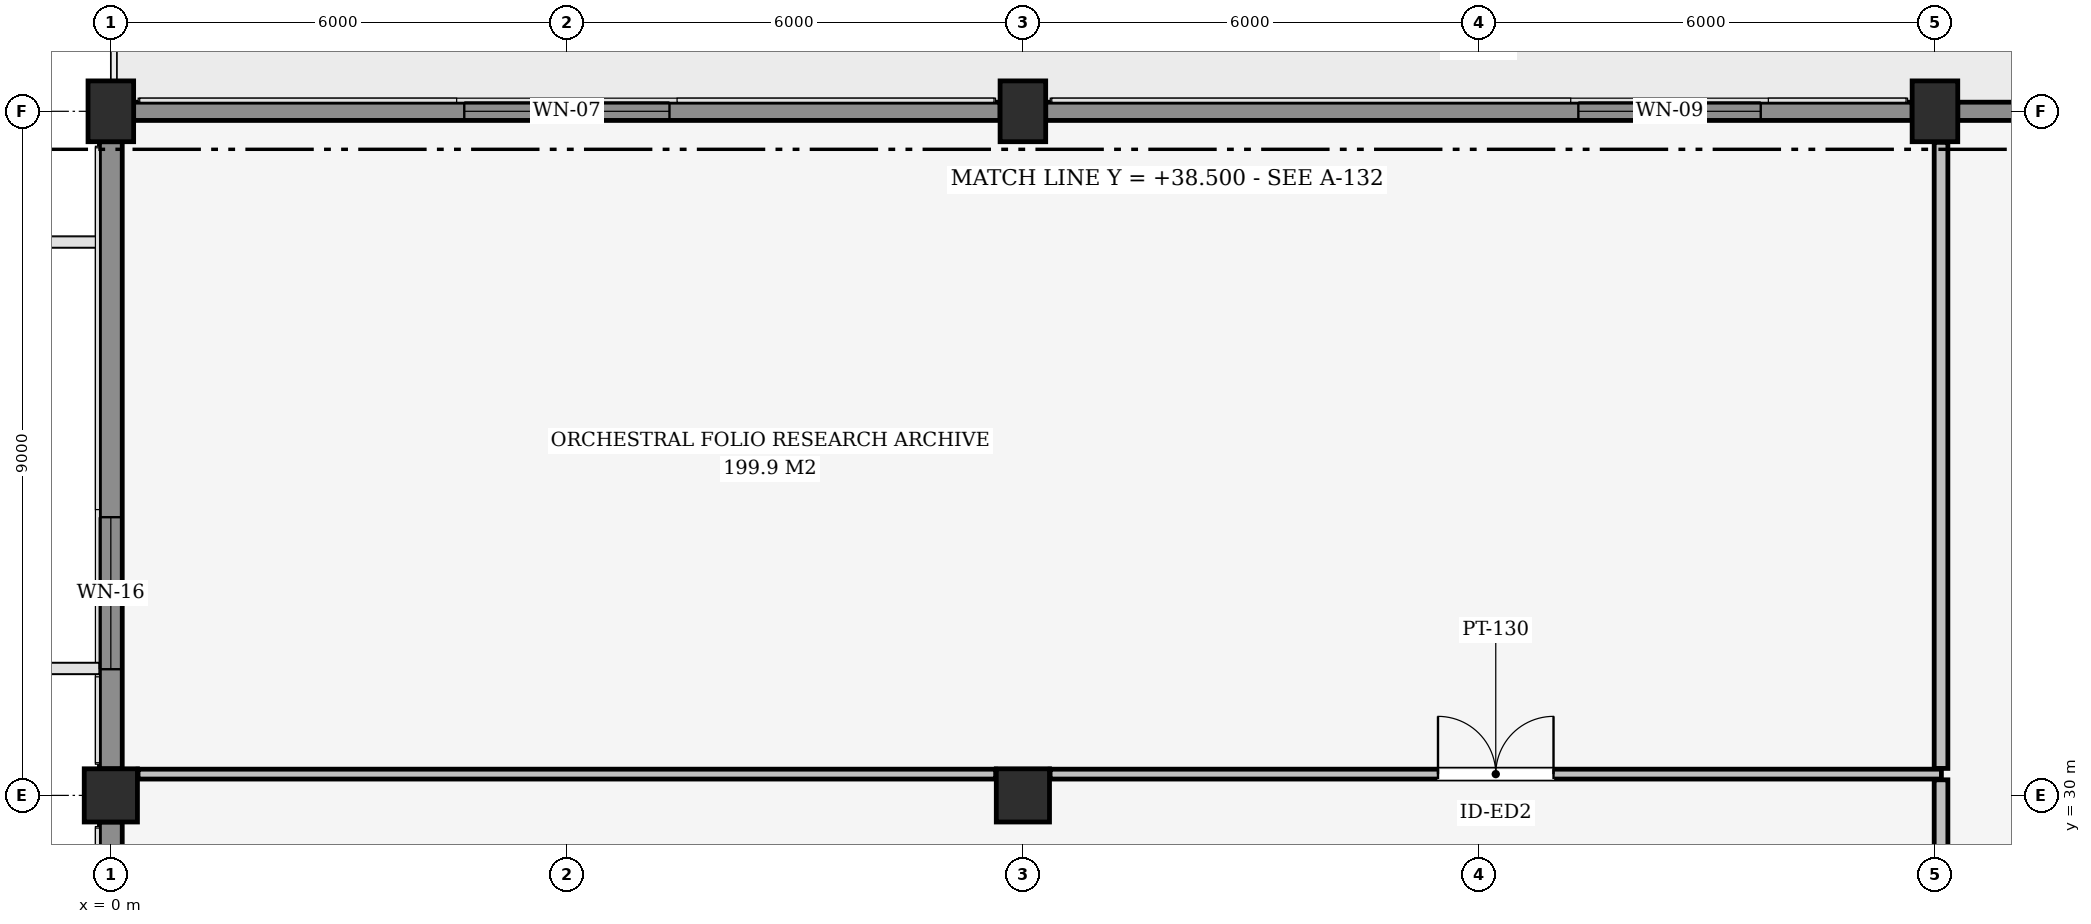
"""IFC4 building model, lengths in metres.
Left out: names, types, materials, properties, quantities, classifications, styles, units other than length and angle.
Written with IfcOpenShell. Run it as: python <this file> out.ifc"""

import sys

from ifc_helpers import new_model, si_unit, direction, frame, frame_2d, origin, origin_2d, place, context, subcontext, project, spatial, rectangle, extrude, element, fill, save


model = new_model("IFC4")
c1 = context("Model", 3, precision=1e-05, world=origin(), true_north=direction((0.0, 1.0)))
c2 = subcontext(c1, "Body", "Model", "MODEL_VIEW")
j1 = project(units=[si_unit("LENGTHUNIT", "METRE"), si_unit("PLANEANGLEUNIT", "RADIAN")], contexts=[c1])
p1 = place(None, origin())
s1 = spatial("IfcSite", under=j1, at=p1, CompositionType="ELEMENT")
p2 = place(p1, origin())
s2 = spatial("IfcBuilding", under=s1, at=p2, CompositionType="ELEMENT")
p3 = place(p2, frame((0.0, 0.0, 9.3)))
s3 = spatial("IfcBuildingStorey", under=s2, at=p3, CompositionType="ELEMENT", Elevation=9.3)
for number, where, z_axis, x_axis in (
    (1, (0.0, 39.0, 0.0), (0.0, 0.0, 1.0), (1.0, 0.0, 0.0)),
    (2, (12.0, 39.0, 0.0), (0.0, 0.0, 1.0), (1.0, 0.0, 0.0)),
    (3, (24.0, 39.0, 0.0), (0.0, 0.0, 1.0), (1.0, 0.0, 0.0)),
):
    element("IfcColumn", number, at=place(p3, frame(where, z_axis=z_axis, x_axis=x_axis)), inside=s3, PredefinedType="COLUMN", context=c2, shape_type="SweptSolid", body=[
        extrude(rectangle(XDim=0.6, YDim=0.8, at=origin_2d()), origin(), (0.0, 0.0, 1.0), 4.5),
    ])
for number, where, z_axis, x_axis in (
    (4, (0.0, 30.0, 0.0), (0.0, 0.0, 1.0), (1.0, 0.0, 0.0)),
    (5, (12.0, 30.0, 0.0), (0.0, 0.0, 1.0), (1.0, 0.0, 0.0)),
):
    element("IfcColumn", number, at=place(p3, frame(where, z_axis=z_axis, x_axis=x_axis)), inside=s3, PredefinedType="COLUMN", context=c2, shape_type="SweptSolid", body=[
        extrude(rectangle(XDim=0.7, YDim=0.7, at=origin_2d()), origin(), (0.0, 0.0, 1.0), 4.5),
    ])
p4 = place(p3, frame((0.3, 39.0, 0.0), z_axis=(0.0, 0.0, 1.0), x_axis=(1.0, 0.0, 0.0)))
e6 = element("IfcWall", 6, at=p4, inside=s3, PredefinedType="SOLIDWALL", context=c2, shape_type="SweptSolid", body=[
    extrude(rectangle(XDim=11.4, YDim=0.24, at=frame_2d((5.7, 0.0))), origin(), (0.0, 0.0, 1.0), 3.873),
])
p5 = place(p4, frame((4.35, 0.0, 0.85)))
e7 = element("IfcOpeningElement", 7, at=p5, cuts=e6, PredefinedType="OPENING", context=c2, shape_type="SweptSolid", body=[
    extrude(rectangle(XDim=2.7, YDim=1.95, at=frame_2d((1.35, 0.975))), frame((0.0, 0.13, 0.0), z_axis=(0.0, -1.0, 0.0), x_axis=(1.0, 0.0, 0.0)), (0.0, 0.0, 1.0), 0.26),
])
p6 = place(p3, frame((12.3, 39.0, 0.0), z_axis=(0.0, 0.0, 1.0), x_axis=(1.0, 0.0, 0.0)))
e8 = element("IfcWall", 8, at=p6, inside=s3, PredefinedType="SOLIDWALL", context=c2, shape_type="SweptSolid", body=[
    extrude(rectangle(XDim=11.4, YDim=0.24, at=frame_2d((5.7, 0.0))), origin(), (0.0, 0.0, 1.0), 3.873),
])
p7 = place(p6, frame((7.008, 0.0, 0.85)))
e9 = element("IfcOpeningElement", 9, at=p7, cuts=e8, PredefinedType="OPENING", context=c2, shape_type="SweptSolid", body=[
    extrude(rectangle(XDim=2.4, YDim=0.95, at=frame_2d((1.2, 0.475))), frame((0.0, 0.13, 0.0), z_axis=(0.0, -1.0, 0.0), x_axis=(1.0, 0.0, 0.0)), (0.0, 0.0, 1.0), 0.26),
])
p8 = place(p3, frame((24.3, 39.0, 0.0), z_axis=(0.0, 0.0, 1.0), x_axis=(1.0, 0.0, 0.0)))
e10 = element("IfcWall", 10, at=p8, inside=s3, PredefinedType="SOLIDWALL", context=c2, shape_type="SweptSolid", body=[
    extrude(rectangle(XDim=11.4, YDim=0.24, at=frame_2d((5.7, 0.0))), origin(), (0.0, 0.0, 1.0), 3.873),
])
p9 = place(p8, frame((4.9, 0.0, 0.0)))
e11 = element("IfcOpeningElement", 11, at=p9, cuts=e10, PredefinedType="OPENING", context=c2, shape_type="SweptSolid", body=[
    extrude(rectangle(XDim=1.6, YDim=2.3, at=frame_2d((0.8, 1.15))), frame((0.0, 0.13, 0.0), z_axis=(0.0, -1.0, 0.0), x_axis=(1.0, 0.0, 0.0)), (0.0, 0.0, 1.0), 0.26),
])
p10 = place(p3, frame((0.0, 15.95, 0.0), z_axis=(0.0, 0.0, 1.0), x_axis=(0.0, 1.0, 0.0)))
e12 = element("IfcWall", 12, at=p10, inside=s3, PredefinedType="SOLIDWALL", context=c2, shape_type="SweptSolid", body=[
    extrude(rectangle(XDim=13.7, YDim=0.3, at=frame_2d((6.85, 0.0))), origin(), (0.0, 0.0, 1.0), 3.869),
])
p11 = place(p10, frame((8.364, 0.0, 0.6)))
e13 = element("IfcOpeningElement", 13, at=p11, cuts=e12, PredefinedType="OPENING", context=c2, shape_type="SweptSolid", body=[
    extrude(rectangle(XDim=3.0, YDim=2.1, at=frame_2d((1.5, 1.05))), frame((0.0, 0.16, 0.0), z_axis=(0.0, -1.0, 0.0), x_axis=(1.0, 0.0, 0.0)), (0.0, 0.0, 1.0), 0.32),
])
p12 = place(p3, frame((0.0, 30.35, 0.0), z_axis=(0.0, 0.0, 1.0), x_axis=(0.0, 1.0, 0.0)))
e14 = element("IfcWall", 14, at=p12, inside=s3, PredefinedType="SOLIDWALL", context=c2, shape_type="SweptSolid", body=[
    extrude(rectangle(XDim=8.25, YDim=0.3, at=frame_2d((4.125, 0.0))), origin(), (0.0, 0.0, 1.0), 3.869),
])
p13 = place(p12, frame((1.31, 0.0, 0.85)))
e15 = element("IfcOpeningElement", 15, at=p13, cuts=e14, PredefinedType="OPENING", context=c2, shape_type="SweptSolid", body=[
    extrude(rectangle(XDim=2.0, YDim=1.85, at=frame_2d((1.0, 0.925))), frame((0.0, 0.16, 0.0), z_axis=(0.0, -1.0, 0.0), x_axis=(1.0, 0.0, 0.0)), (0.0, 0.0, 1.0), 0.32),
])
p14 = place(p3, frame((0.358, 30.28, 0.0), z_axis=(0.0, 0.0, 1.0), x_axis=(1.0, 0.0, 0.0)))
e16 = element("IfcWall", 16, at=p14, inside=s3, PredefinedType="PARTITIONING", context=c2, shape_type="SweptSolid", body=[
    extrude(rectangle(XDim=11.284, YDim=0.13, at=frame_2d((5.642, 0.0))), origin(), (0.0, 0.0, 1.0), 3.873),
])
p15 = place(p3, frame((12.358, 30.28, 0.0), z_axis=(0.0, 0.0, 1.0), x_axis=(1.0, 0.0, 0.0)))
e17 = element("IfcWall", 17, at=p15, inside=s3, PredefinedType="PARTITIONING", context=c2, shape_type="SweptSolid", body=[
    extrude(rectangle(XDim=11.727, YDim=0.13, at=frame_2d((5.864, 0.0))), origin(), (0.0, 0.0, 1.0), 3.18),
])
p16 = place(p15, frame((5.104, 0.0, 0.0)))
e18 = element("IfcOpeningElement", 18, at=p16, cuts=e17, PredefinedType="OPENING", context=c2, shape_type="SweptSolid", body=[
    extrude(rectangle(XDim=1.52, YDim=2.24, at=frame_2d((0.76, 1.12))), frame((0.0, 0.075, 0.0), z_axis=(0.0, -1.0, 0.0), x_axis=(1.0, 0.0, 0.0)), (0.0, 0.0, 1.0), 0.15),
])
p17 = place(p3, frame((24.08, 15.615, 0.0), z_axis=(0.0, 0.0, 1.0), x_axis=(0.0, 1.0, 0.0)))
e19 = element("IfcWall", 19, at=p17, inside=s3, PredefinedType="PARTITIONING", context=c2, shape_type="SweptSolid", body=[
    extrude(rectangle(XDim=14.59, YDim=0.18, at=frame_2d((7.295, 0.0))), origin(), (0.0, 0.0, 1.0), 3.944),
])
p18 = place(p17, frame((6.435, 0.0, 0.0)))
e20 = element("IfcOpeningElement", 20, at=p18, cuts=e19, PredefinedType="OPENING", context=c2, shape_type="SweptSolid", body=[
    extrude(rectangle(XDim=1.72, YDim=2.34, at=frame_2d((0.86, 1.17))), frame((0.0, 0.1, 0.0), z_axis=(0.0, -1.0, 0.0), x_axis=(1.0, 0.0, 0.0)), (0.0, 0.0, 1.0), 0.2),
])
p19 = place(p3, frame((24.08, 30.355, 0.0), z_axis=(0.0, 0.0, 1.0), x_axis=(0.0, 1.0, 0.0)))
e21 = element("IfcWall", 21, at=p19, inside=s3, PredefinedType="PARTITIONING", context=c2, shape_type="SweptSolid", body=[
    extrude(rectangle(XDim=8.237, YDim=0.18, at=frame_2d((4.119, 0.0))), origin(), (0.0, 0.0, 1.0), 3.944),
])
p20 = place(p5, origin())
e22 = element("IfcWindow", 22, at=p20, inside=s3, PartitioningType="SINGLE_PANEL", PredefinedType="WINDOW", context=c2, shape_type="SweptSolid", body=[
    extrude(rectangle(XDim=2.7, YDim=1.95, at=frame_2d((1.35, 0.975))), frame((0.0, 0.03, 0.0), z_axis=(0.0, -1.0, 0.0), x_axis=(1.0, 0.0, 0.0)), (0.0, 0.0, 1.0), 0.06),
])
fill(e7, e22)
p21 = place(p7, origin())
e23 = element("IfcWindow", 23, at=p21, inside=s3, PartitioningType="SINGLE_PANEL", PredefinedType="WINDOW", context=c2, shape_type="SweptSolid", body=[
    extrude(rectangle(XDim=2.4, YDim=0.95, at=frame_2d((1.2, 0.475))), frame((0.0, 0.03, 0.0), z_axis=(0.0, -1.0, 0.0), x_axis=(1.0, 0.0, 0.0)), (0.0, 0.0, 1.0), 0.06),
])
fill(e9, e23)
p22 = place(p13, origin())
e24 = element("IfcWindow", 24, at=p22, inside=s3, PartitioningType="SINGLE_PANEL", PredefinedType="WINDOW", context=c2, shape_type="SweptSolid", body=[
    extrude(rectangle(XDim=2.0, YDim=1.85, at=frame_2d((1.0, 0.925))), frame((0.0, 0.03, 0.0), z_axis=(0.0, -1.0, 0.0), x_axis=(1.0, 0.0, 0.0)), (0.0, 0.0, 1.0), 0.06),
])
fill(e15, e24)
p23 = place(p16, origin())
e25 = element("IfcDoor", 25, at=p23, inside=s3, OperationType="DOUBLE_DOOR_SINGLE_SWING", PredefinedType="DOOR", context=c2, shape_type="SweptSolid", body=[
    extrude(rectangle(XDim=1.52, YDim=2.24, at=frame_2d((0.76, 1.12))), frame((0.0, 0.025, 0.0), z_axis=(0.0, -1.0, 0.0), x_axis=(1.0, 0.0, 0.0)), (0.0, 0.0, 1.0), 0.05),
])
fill(e18, e25)
save(model, sys.argv[1])
